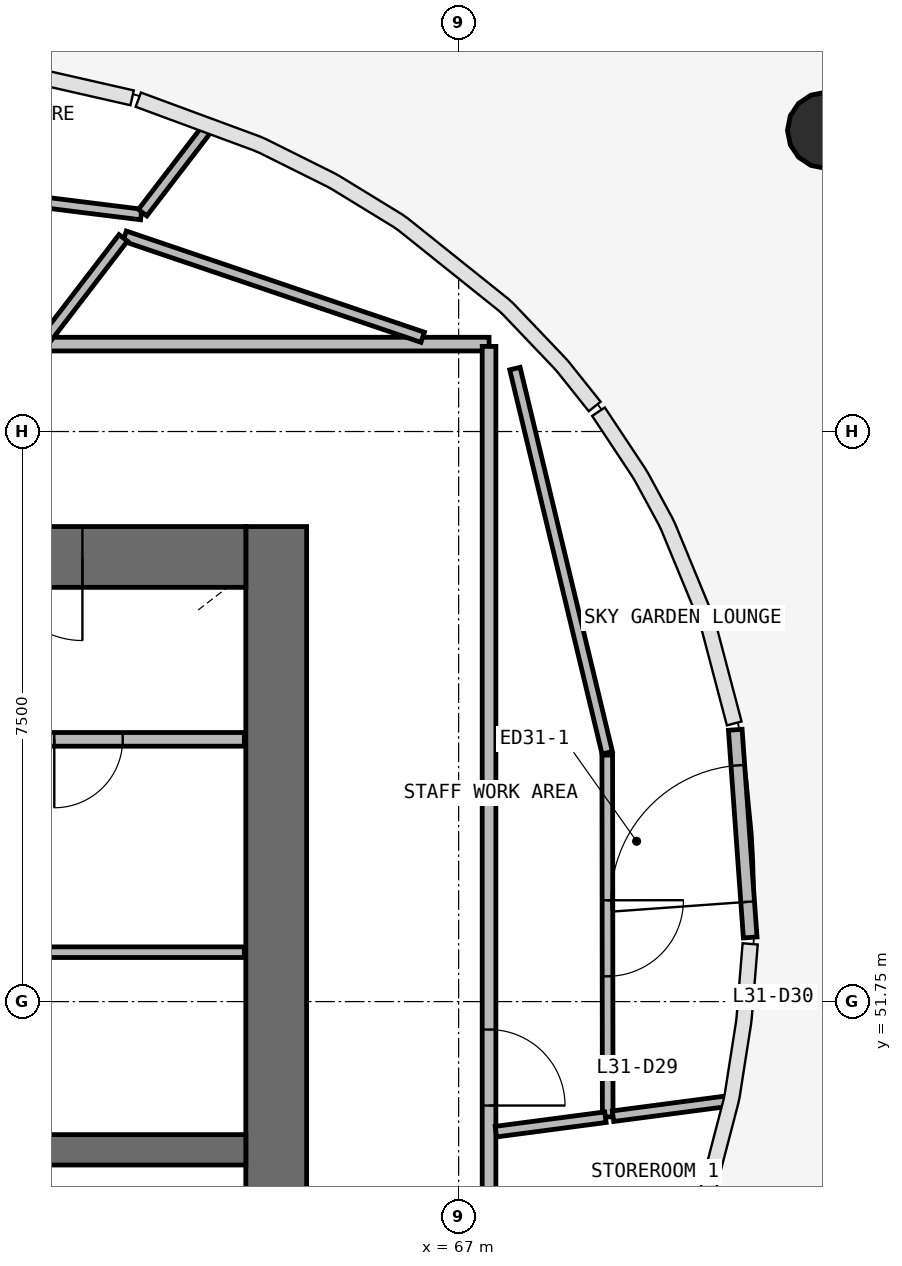
"""IFC4 building model, lengths in metres.
Left out: names, types, materials, properties, quantities, classifications, styles, units other than length and angle.
Written with IfcOpenShell. Run it as: python <this file> out.ifc"""

import sys

from ifc_helpers import new_model, si_unit, direction, frame, frame_2d, origin, origin_2d, place, context, subcontext, project, spatial, rectangle, circle, extrude, source, transform, mapped, element, fill, save


model = new_model("IFC4")
c1 = context("Model", 3, precision=1e-05, world=origin(), true_north=direction((0.0, 1.0)))
c2 = subcontext(c1, "Body", "Model", "MODEL_VIEW")
j1 = project(units=[si_unit("LENGTHUNIT", "METRE"), si_unit("PLANEANGLEUNIT", "RADIAN")], contexts=[c1])
p1 = place(None, origin())
s1 = spatial("IfcSite", under=j1, at=p1, CompositionType="ELEMENT")
p2 = place(p1, origin())
s2 = spatial("IfcBuilding", under=s1, at=p2, CompositionType="ELEMENT")
p3 = place(p2, frame((0.0, 0.0, 133.1)))
s3 = spatial("IfcBuildingStorey", under=s2, at=p3, CompositionType="ELEMENT", Elevation=133.1)
p4 = place(p3, frame((64.6, 38.0, 0.0), z_axis=(0.0, 0.0, 1.0), x_axis=(0.0, 1.0, 0.0)))
e1 = element("IfcWall", 1, at=p4, inside=s3, PredefinedType="SHEAR", context=c2, shape_type="SweptSolid", body=[
    extrude(rectangle(XDim=20.0, YDim=0.8, at=frame_2d((10.0, 0.0))), origin(), (0.0, 0.0, 1.0), 3.9),
])
p5 = place(p4, frame((9.1, 0.0, 0.0)))
e2 = element("IfcOpeningElement", 2, at=p5, cuts=e1, PredefinedType="OPENING", context=c2, shape_type="SweptSolid", body=[
    extrude(rectangle(XDim=1.8, YDim=2.1, at=frame_2d((0.9, 1.05))), frame((0.0, 0.41, 0.0), z_axis=(0.0, -1.0, 0.0), x_axis=(1.0, 0.0, 0.0)), (0.0, 0.0, 1.0), 0.82),
])
p6 = place(p3, frame((64.2, 57.6, 0.0), z_axis=(0.0, 0.0, 1.0), x_axis=(-1.0, 0.0, 0.0)))
e3 = element("IfcWall", 3, at=p6, inside=s3, PredefinedType="SHEAR", context=c2, shape_type="SweptSolid", body=[
    extrude(rectangle(XDim=24.4, YDim=0.8, at=frame_2d((12.2, 0.0))), origin(), (0.0, 0.0, 1.0), 3.9),
])
p7 = place(p6, frame((21.65, 0.0, 0.0)))
e4 = element("IfcOpeningElement", 4, at=p7, cuts=e3, PredefinedType="OPENING", context=c2, shape_type="SweptSolid", body=[
    extrude(rectangle(XDim=1.1, YDim=2.1, at=frame_2d((0.55, 1.05))), frame((0.0, 0.41, 0.0), z_axis=(0.0, -1.0, 0.0), x_axis=(1.0, 0.0, 0.0)), (0.0, 0.0, 1.0), 0.82),
])
p8 = place(p6, frame((2.15, 0.0, 0.0)))
e5 = element("IfcOpeningElement", 5, at=p8, cuts=e3, PredefinedType="OPENING", context=c2, shape_type="SweptSolid", body=[
    extrude(rectangle(XDim=1.1, YDim=2.1, at=frame_2d((0.55, 1.05))), frame((0.0, 0.41, 0.0), z_axis=(0.0, -1.0, 0.0), x_axis=(1.0, 0.0, 0.0)), (0.0, 0.0, 1.0), 0.82),
])
p9 = place(p3, frame((39.8, 49.8, 0.0), z_axis=(0.0, 0.0, 1.0), x_axis=(1.0, 0.0, 0.0)))
e6 = element("IfcWall", 6, at=p9, inside=s3, PredefinedType="SHEAR", context=c2, shape_type="SweptSolid", body=[
    extrude(rectangle(XDim=24.4, YDim=0.4, at=frame_2d((12.2, 0.0))), origin(), (0.0, 0.0, 1.0), 3.9),
])
p10 = place(p9, frame((13.6, 0.0, 0.0)))
e7 = element("IfcOpeningElement", 7, at=p10, cuts=e6, PredefinedType="OPENING", context=c2, shape_type="SweptSolid", body=[
    extrude(rectangle(XDim=1.1, YDim=2.1, at=frame_2d((0.55, 1.05))), frame((0.0, 0.21, 0.0), z_axis=(0.0, -1.0, 0.0), x_axis=(1.0, 0.0, 0.0)), (0.0, 0.0, 1.0), 0.42),
])
p11 = place(p9, frame((16.1, 0.0, 0.0)))
e8 = element("IfcOpeningElement", 8, at=p11, cuts=e6, PredefinedType="OPENING", context=c2, shape_type="SweptSolid", body=[
    extrude(rectangle(XDim=1.1, YDim=2.1, at=frame_2d((0.55, 1.05))), frame((0.0, 0.21, 0.0), z_axis=(0.0, -1.0, 0.0), x_axis=(1.0, 0.0, 0.0)), (0.0, 0.0, 1.0), 0.42),
])
p12 = place(p9, frame((18.6, 0.0, 0.0)))
e9 = element("IfcOpeningElement", 9, at=p12, cuts=e6, PredefinedType="OPENING", context=c2, shape_type="SweptSolid", body=[
    extrude(rectangle(XDim=1.1, YDim=2.1, at=frame_2d((0.55, 1.05))), frame((0.0, 0.21, 0.0), z_axis=(0.0, -1.0, 0.0), x_axis=(1.0, 0.0, 0.0)), (0.0, 0.0, 1.0), 0.42),
])
p13 = place(p9, frame((4.7, 0.0, 0.0)))
e10 = element("IfcOpeningElement", 10, at=p13, cuts=e6, PredefinedType="OPENING", context=c2, shape_type="SweptSolid", body=[
    extrude(rectangle(XDim=1.1, YDim=2.1, at=frame_2d((0.55, 1.05))), frame((0.0, 0.21, 0.0), z_axis=(0.0, -1.0, 0.0), x_axis=(1.0, 0.0, 0.0)), (0.0, 0.0, 1.0), 0.42),
])
p14 = place(p9, frame((7.2, 0.0, 0.0)))
e11 = element("IfcOpeningElement", 11, at=p14, cuts=e6, PredefinedType="OPENING", context=c2, shape_type="SweptSolid", body=[
    extrude(rectangle(XDim=1.1, YDim=2.1, at=frame_2d((0.55, 1.05))), frame((0.0, 0.21, 0.0), z_axis=(0.0, -1.0, 0.0), x_axis=(1.0, 0.0, 0.0)), (0.0, 0.0, 1.0), 0.42),
])
p15 = place(p9, frame((9.7, 0.0, 0.0)))
e12 = element("IfcOpeningElement", 12, at=p15, cuts=e6, PredefinedType="OPENING", context=c2, shape_type="SweptSolid", body=[
    extrude(rectangle(XDim=1.1, YDim=2.1, at=frame_2d((0.55, 1.05))), frame((0.0, 0.21, 0.0), z_axis=(0.0, -1.0, 0.0), x_axis=(1.0, 0.0, 0.0)), (0.0, 0.0, 1.0), 0.42),
])
p16 = place(p9, frame((20.65, 0.0, 0.0)))
e13 = element("IfcOpeningElement", 13, at=p16, cuts=e6, PredefinedType="OPENING", context=c2, shape_type="SweptSolid", body=[
    extrude(rectangle(XDim=0.9, YDim=2.1, at=frame_2d((0.45, 1.05))), frame((0.0, 0.21, 0.0), z_axis=(0.0, -1.0, 0.0), x_axis=(1.0, 0.0, 0.0)), (0.0, 0.0, 1.0), 0.42),
])
p17 = place(p9, frame((11.85, 0.0, 0.0)))
e14 = element("IfcOpeningElement", 14, at=p17, cuts=e6, PredefinedType="OPENING", context=c2, shape_type="SweptSolid", body=[
    extrude(rectangle(XDim=0.9, YDim=2.1, at=frame_2d((0.45, 1.05))), frame((0.0, 0.21, 0.0), z_axis=(0.0, -1.0, 0.0), x_axis=(1.0, 0.0, 0.0)), (0.0, 0.0, 1.0), 0.42),
])
m1 = source(origin(), c2, "Body", "SweptSolid", [
    extrude(circle(Radius=0.5, at=origin_2d()), origin(), (0.0, 0.0, 1.0), 4.22),
])
p18 = place(p3, frame((71.826, 63.213, -0.32), z_axis=(0.0, 0.0, 1.0), x_axis=(1.0, 0.0, 0.0)))
e15 = element("IfcColumn", 15, at=p18, inside=s3, PredefinedType="COLUMN", context=c2, shape_type="MappedRepresentation", body=[
    mapped(m1, transform((0.0, 0.0, 0.0), scale=1.0)),
])
p19 = place(p3, frame((70.836, 52.594, 0.0), z_axis=(0.0, 0.0, 1.0), x_axis=(-0.071747420295, 0.997422832945, 0.0)))
e16 = element("IfcWall", 16, at=p19, inside=s3, PredefinedType="STANDARD", context=c2, shape_type="SweptSolid", body=[
    extrude(rectangle(XDim=2.739, YDim=0.18, at=frame_2d((1.37, 0.0))), origin(), (0.0, 0.0, 1.0), 3.58),
])
p20 = place(p19, frame((0.469, 0.0, 0.0)))
e17 = element("IfcOpeningElement", 17, at=p20, cuts=e16, PredefinedType="OPENING", context=c2, shape_type="SweptSolid", body=[
    extrude(rectangle(XDim=1.8, YDim=2.4, at=frame_2d((0.9, 1.2))), frame((0.0, 0.1, 0.0), z_axis=(0.0, -1.0, 0.0), x_axis=(1.0, 0.0, 0.0)), (0.0, 0.0, 1.0), 0.2),
])
p21 = place(p3, frame((36.6, 60.4, 0.0), z_axis=(0.0, 0.0, 1.0), x_axis=(1.0, 0.0, 0.0)))
e18 = element("IfcWall", 18, at=p21, inside=s3, PredefinedType="PARTITIONING", context=c2, shape_type="SweptSolid", body=[
    extrude(rectangle(XDim=30.8, YDim=0.18, at=frame_2d((15.4, 0.0))), origin(), (0.0, 0.0, 1.0), 2.88),
])
p22 = place(p21, frame((22.25, 0.0, 0.0)))
e19 = element("IfcOpeningElement", 19, at=p22, cuts=e18, PredefinedType="OPENING", context=c2, shape_type="SweptSolid", body=[
    extrude(rectangle(XDim=0.9, YDim=2.1, at=frame_2d((0.45, 1.05))), frame((0.0, 0.1, 0.0), z_axis=(0.0, -1.0, 0.0), x_axis=(1.0, 0.0, 0.0)), (0.0, 0.0, 1.0), 0.2),
])
p23 = place(p21, frame((19.65, 0.0, 0.0)))
e20 = element("IfcOpeningElement", 20, at=p23, cuts=e18, PredefinedType="OPENING", context=c2, shape_type="SweptSolid", body=[
    extrude(rectangle(XDim=0.9, YDim=2.1, at=frame_2d((0.45, 1.05))), frame((0.0, 0.1, 0.0), z_axis=(0.0, -1.0, 0.0), x_axis=(1.0, 0.0, 0.0)), (0.0, 0.0, 1.0), 0.2),
])
p24 = place(p21, frame((17.25, 0.0, 0.0)))
e21 = element("IfcOpeningElement", 21, at=p24, cuts=e18, PredefinedType="OPENING", context=c2, shape_type="SweptSolid", body=[
    extrude(rectangle(XDim=0.9, YDim=2.1, at=frame_2d((0.45, 1.05))), frame((0.0, 0.1, 0.0), z_axis=(0.0, -1.0, 0.0), x_axis=(1.0, 0.0, 0.0)), (0.0, 0.0, 1.0), 0.2),
])
p25 = place(p21, frame((14.95, 0.0, 0.0)))
e22 = element("IfcOpeningElement", 22, at=p25, cuts=e18, PredefinedType="OPENING", context=c2, shape_type="SweptSolid", body=[
    extrude(rectangle(XDim=1.0, YDim=2.1, at=frame_2d((0.5, 1.05))), frame((0.0, 0.1, 0.0), z_axis=(0.0, -1.0, 0.0), x_axis=(1.0, 0.0, 0.0)), (0.0, 0.0, 1.0), 0.2),
])
p26 = place(p21, frame((8.95, 0.0, 0.0)))
e23 = element("IfcOpeningElement", 23, at=p26, cuts=e18, PredefinedType="OPENING", context=c2, shape_type="SweptSolid", body=[
    extrude(rectangle(XDim=1.0, YDim=2.1, at=frame_2d((0.5, 1.05))), frame((0.0, 0.1, 0.0), z_axis=(0.0, -1.0, 0.0), x_axis=(1.0, 0.0, 0.0)), (0.0, 0.0, 1.0), 0.2),
])
p27 = place(p3, frame((67.4, 60.37, 0.0), z_axis=(0.0, 0.0, 1.0), x_axis=(0.0, -1.0, 0.0)))
e24 = element("IfcWall", 24, at=p27, inside=s3, PredefinedType="PARTITIONING", context=c2, shape_type="SweptSolid", body=[
    extrude(rectangle(XDim=23.638, YDim=0.18, at=frame_2d((11.819, 0.0))), origin(), (0.0, 0.0, 1.0), 2.88),
])
p28 = place(p27, frame((8.988, 0.0, 0.0)))
e25 = element("IfcOpeningElement", 25, at=p28, cuts=e24, PredefinedType="OPENING", context=c2, shape_type="SweptSolid", body=[
    extrude(rectangle(XDim=1.0, YDim=2.1, at=frame_2d((0.5, 1.05))), frame((0.0, 0.1, 0.0), z_axis=(0.0, -1.0, 0.0), x_axis=(1.0, 0.0, 0.0)), (0.0, 0.0, 1.0), 0.2),
])
p29 = place(p27, frame((14.587, 0.0, 0.0)))
e26 = element("IfcOpeningElement", 26, at=p29, cuts=e24, PredefinedType="OPENING", context=c2, shape_type="SweptSolid", body=[
    extrude(rectangle(XDim=1.0, YDim=2.1, at=frame_2d((0.5, 1.05))), frame((0.0, 0.1, 0.0), z_axis=(0.0, -1.0, 0.0), x_axis=(1.0, 0.0, 0.0)), (0.0, 0.0, 1.0), 0.2),
])
p30 = place(p27, frame((11.387, 0.0, 0.0)))
e27 = element("IfcOpeningElement", 27, at=p30, cuts=e24, PredefinedType="OPENING", context=c2, shape_type="SweptSolid", body=[
    extrude(rectangle(XDim=1.0, YDim=2.1, at=frame_2d((0.5, 1.05))), frame((0.0, 0.1, 0.0), z_axis=(0.0, -1.0, 0.0), x_axis=(1.0, 0.0, 0.0)), (0.0, 0.0, 1.0), 0.2),
])
p31 = place(p3, frame((64.18, 55.2, 0.0), z_axis=(0.0, 0.0, 1.0), x_axis=(-1.0, 0.0, 0.0)))
e28 = element("IfcWall", 28, at=p31, inside=s3, PredefinedType="PARTITIONING", context=c2, shape_type="SweptSolid", body=[
    extrude(rectangle(XDim=3.95, YDim=0.18, at=frame_2d((1.975, 0.0))), origin(), (0.0, 0.0, 1.0), 3.58),
])
p32 = place(p31, frame((1.6, 0.0, 0.0)))
e29 = element("IfcOpeningElement", 29, at=p32, cuts=e28, PredefinedType="OPENING", context=c2, shape_type="SweptSolid", body=[
    extrude(rectangle(XDim=0.9, YDim=2.1, at=frame_2d((0.45, 1.05))), frame((0.0, 0.1, 0.0), z_axis=(0.0, -1.0, 0.0), x_axis=(1.0, 0.0, 0.0)), (0.0, 0.0, 1.0), 0.2),
])
p33 = place(p3, frame((68.955, 55.023, 0.0), z_axis=(0.0, 0.0, 1.0), x_axis=(-0.233630483272, 0.97232545852, 0.0)))
e30 = element("IfcWall", 30, at=p33, inside=s3, PredefinedType="PARTITIONING", context=c2, shape_type="SweptSolid", body=[
    extrude(rectangle(XDim=5.199, YDim=0.14, at=frame_2d((2.599, 0.0))), origin(), (0.0, 0.0, 1.0), 2.88),
])
p34 = place(p3, frame((68.955, 54.993, 0.0), z_axis=(0.0, 0.0, 1.0), x_axis=(0.001230894544, -0.999999242449, 0.0)))
e31 = element("IfcWall", 31, at=p34, inside=s3, PredefinedType="PARTITIONING", context=c2, shape_type="SweptSolid", body=[
    extrude(rectangle(XDim=4.76, YDim=0.14, at=frame_2d((2.38, 0.0))), origin(), (0.0, 0.0, 1.0), 2.88),
])
p35 = place(p34, frame((1.91, 0.0, 0.0)))
e32 = element("IfcOpeningElement", 32, at=p35, cuts=e31, PredefinedType="OPENING", context=c2, shape_type="SweptSolid", body=[
    extrude(rectangle(XDim=1.0, YDim=2.1, at=frame_2d((0.5, 1.05))), frame((0.0, 0.08, 0.0), z_axis=(0.0, -1.0, 0.0), x_axis=(1.0, 0.0, 0.0)), (0.0, 0.0, 1.0), 0.16),
])
p36 = place(p3, frame((62.823, 62.105, 0.0), z_axis=(0.0, 0.0, 1.0), x_axis=(-0.992341485201, 0.123524802163, 0.0)))
e33 = element("IfcWall", 33, at=p36, inside=s3, PredefinedType="PARTITIONING", context=c2, shape_type="SweptSolid", body=[
    extrude(rectangle(XDim=4.773, YDim=0.14, at=frame_2d((2.387, 0.0))), origin(), (0.0, 0.0, 1.0), 2.88),
])
p37 = place(p3, frame((66.527, 60.49, 0.0), z_axis=(0.0, 0.0, 1.0), x_axis=(-0.946923916586, 0.321457767362, 0.0)))
e34 = element("IfcWall", 34, at=p37, inside=s3, PredefinedType="PARTITIONING", context=c2, shape_type="SweptSolid", body=[
    extrude(rectangle(XDim=4.141, YDim=0.14, at=frame_2d((2.071, 0.0))), origin(), (0.0, 0.0, 1.0), 2.88),
])
p38 = place(p3, frame((64.18, 52.4, 0.0), z_axis=(0.0, 0.0, 1.0), x_axis=(-1.0, 0.0, 0.0)))
e35 = element("IfcWall", 35, at=p38, inside=s3, PredefinedType="PARTITIONING", context=c2, shape_type="SweptSolid", body=[
    extrude(rectangle(XDim=3.95, YDim=0.14, at=frame_2d((1.975, 0.0))), origin(), (0.0, 0.0, 1.0), 2.88),
])
p39 = place(p3, frame((61.584, 60.49, 0.0), z_axis=(0.0, 0.0, 1.0), x_axis=(0.608758070133, 0.793355917636, 0.0)))
e36 = element("IfcWall", 36, at=p39, inside=s3, PredefinedType="PARTITIONING", context=c2, shape_type="SweptSolid", body=[
    extrude(rectangle(XDim=1.648, YDim=0.14, at=frame_2d((0.824, 0.0))), origin(), (0.0, 0.0, 1.0), 2.88),
])
p40 = place(p3, frame((69.031, 50.242, 0.0), z_axis=(0.0, 0.0, 1.0), x_axis=(0.991444899248, 0.130525904535, 0.0)))
e37 = element("IfcWall", 37, at=p40, inside=s3, PredefinedType="PARTITIONING", context=c2, shape_type="SweptSolid", body=[
    extrude(rectangle(XDim=1.504, YDim=0.14, at=frame_2d((0.752, 0.0))), origin(), (0.0, 0.0, 1.0), 2.88),
])
p41 = place(p3, frame((67.49, 50.039, 0.0), z_axis=(0.0, 0.0, 1.0), x_axis=(0.991450865751, 0.130480576336, 0.0)))
e38 = element("IfcWall", 38, at=p41, inside=s3, PredefinedType="PARTITIONING", context=c2, shape_type="SweptSolid", body=[
    extrude(rectangle(XDim=1.454, YDim=0.14, at=frame_2d((0.727, 0.0))), origin(), (0.0, 0.0, 1.0), 2.88),
])
p42 = place(p3, frame((62.842, 62.129, 0.0), z_axis=(0.0, 0.0, 1.0), x_axis=(0.608734731497, 0.793373825299, 0.0)))
e39 = element("IfcWall", 39, at=p42, inside=s3, PredefinedType="PARTITIONING", context=c2, shape_type="SweptSolid", body=[
    extrude(rectangle(XDim=1.403, YDim=0.14, at=frame_2d((0.701, 0.0))), origin(), (0.0, 0.0, 1.0), 2.88),
])
m2 = source(origin(), c2, "Body", "SweptSolid", [
    extrude(rectangle(XDim=1.8, YDim=2.4, at=frame_2d((0.9, 1.2))), frame((0.0, 0.025, 0.0), z_axis=(0.0, -1.0, 0.0), x_axis=(1.0, 0.0, 0.0)), (0.0, 0.0, 1.0), 0.05),
])
p43 = place(p20, origin())
e40 = element("IfcDoor", 40, at=p43, inside=s3, OperationType="DOUBLE_DOOR_SINGLE_SWING", PredefinedType="DOOR", context=c2, shape_type="MappedRepresentation", body=[
    mapped(m2, transform((0.0, 0.0, 0.0), scale=1.0)),
])
fill(e17, e40)
m3 = source(origin(), c2, "Body", "SweptSolid", [
    extrude(rectangle(XDim=1.1, YDim=2.1, at=frame_2d((0.55, 1.05))), frame((0.0, 0.025, 0.0), z_axis=(0.0, -1.0, 0.0), x_axis=(1.0, 0.0, 0.0)), (0.0, 0.0, 1.0), 0.05),
])
p44 = place(p8, origin())
e41 = element("IfcDoor", 41, at=p44, inside=s3, OperationType="SINGLE_SWING_LEFT", PredefinedType="DOOR", context=c2, shape_type="MappedRepresentation", body=[
    mapped(m3, transform((0.0, 0.0, 0.0), scale=1.0)),
])
fill(e5, e41)
m4 = source(origin(), c2, "Body", "SweptSolid", [
    extrude(rectangle(XDim=1.0, YDim=2.1, at=frame_2d((0.5, 1.05))), frame((0.0, 0.025, 0.0), z_axis=(0.0, -1.0, 0.0), x_axis=(1.0, 0.0, 0.0)), (0.0, 0.0, 1.0), 0.05),
])
p45 = place(p28, origin())
e42 = element("IfcDoor", 42, at=p45, inside=s3, OperationType="SINGLE_SWING_RIGHT", PredefinedType="DOOR", context=c2, shape_type="MappedRepresentation", body=[
    mapped(m4, transform((0.0, 0.0, 0.0), scale=1.0)),
])
fill(e25, e42)
p46 = place(p35, origin())
e43 = element("IfcDoor", 43, at=p46, inside=s3, OperationType="SINGLE_SWING_LEFT", PredefinedType="DOOR", context=c2, shape_type="MappedRepresentation", body=[
    mapped(m4, transform((0.0, 0.0, 0.0), scale=1.0)),
])
fill(e32, e43)
m5 = source(origin(), c2, "Body", "SweptSolid", [
    extrude(rectangle(XDim=0.9, YDim=2.1, at=frame_2d((0.45, 1.05))), frame((0.0, 0.025, 0.0), z_axis=(0.0, -1.0, 0.0), x_axis=(1.0, 0.0, 0.0)), (0.0, 0.0, 1.0), 0.05),
])
p47 = place(p32, origin())
e44 = element("IfcDoor", 44, at=p47, inside=s3, OperationType="SINGLE_SWING_RIGHT", PredefinedType="DOOR", context=c2, shape_type="MappedRepresentation", body=[
    mapped(m5, transform((0.0, 0.0, 0.0), scale=1.0)),
])
fill(e29, e44)
save(model, sys.argv[1])
